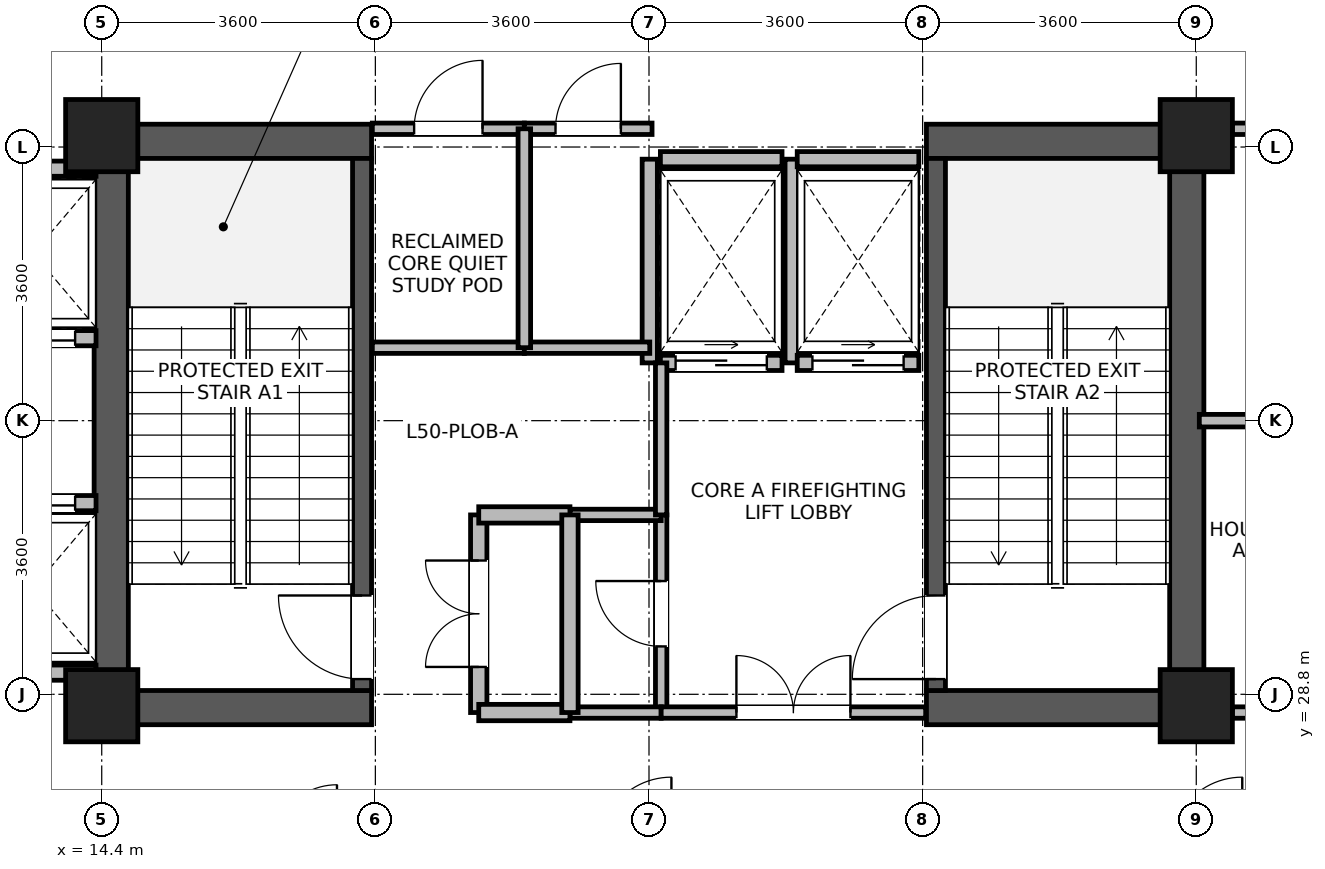
"""IFC4 building model, lengths in metres.
Left out: names, types, materials, properties, quantities, classifications, styles, units other than length and angle.
Written with IfcOpenShell. Run it as: python <this file> out.ifc"""

import sys

from ifc_helpers import new_model, si_unit, direction, frame, frame_2d, origin, origin_2d, place, context, subcontext, project, spatial, rectangle, extrude, source, transform, mapped, element, fill, save


model = new_model("IFC4")
c1 = context("Model", 3, precision=1e-05, world=origin(), true_north=direction((0.0, 1.0)))
c2 = subcontext(c1, "Body", "Model", "MODEL_VIEW")
j1 = project(units=[si_unit("LENGTHUNIT", "METRE"), si_unit("PLANEANGLEUNIT", "RADIAN")], contexts=[c1])
p1 = place(None, origin())
s1 = spatial("IfcSite", under=j1, at=p1, CompositionType="ELEMENT")
p2 = place(p1, origin())
s2 = spatial("IfcBuilding", under=s1, at=p2, CompositionType="ELEMENT")
p3 = place(p2, frame((0.0, 0.0, 197.2)))
s3 = spatial("IfcBuildingStorey", under=s2, at=p3, CompositionType="ELEMENT", Elevation=197.2)
for number, where, z_axis, x_axis in (
    (1, (14.525, 28.4, 0.0), (0.0, 0.0, 1.0), (0.0, 1.0, 0.0)),
    (2, (28.675, 28.4, 0.0), (0.0, 0.0, 1.0), (0.0, 1.0, 0.0)),
):
    element("IfcWall", number, at=place(p3, frame(where, z_axis=z_axis, x_axis=x_axis)), inside=s3, PredefinedType="SHEAR", context=c2, shape_type="SweptSolid", body=[
        extrude(rectangle(XDim=7.9, YDim=0.45, at=frame_2d((3.95, 0.0))), origin(), (0.0, 0.0, 1.0), 4.37),
    ])
for number, where, z_axis, x_axis in (
    (3, (14.75, 28.625, 0.0), (0.0, 0.0, 1.0), (1.0, 0.0, 0.0)),
    (4, (25.25, 28.625, 0.0), (0.0, 0.0, 1.0), (1.0, 0.0, 0.0)),
    (5, (14.75, 36.075, 0.0), (0.0, 0.0, 1.0), (1.0, 0.0, 0.0)),
    (6, (25.25, 36.075, 0.0), (0.0, 0.0, 1.0), (1.0, 0.0, 0.0)),
):
    element("IfcWall", number, at=place(p3, frame(where, z_axis=z_axis, x_axis=x_axis)), inside=s3, PredefinedType="SHEAR", context=c2, shape_type="SweptSolid", body=[
        extrude(rectangle(XDim=3.2, YDim=0.45, at=frame_2d((1.6, 0.0))), origin(), (0.0, 0.0, 1.0), 4.37),
    ])
p4 = place(p3, frame((17.825, 28.85, 0.0), z_axis=(0.0, 0.0, 1.0), x_axis=(0.0, 1.0, 0.0)))
e7 = element("IfcWall", 7, at=p4, inside=s3, PredefinedType="SHEAR", context=c2, shape_type="SweptSolid", body=[
    extrude(rectangle(XDim=7.0, YDim=0.25, at=frame_2d((3.5, 0.0))), origin(), (0.0, 0.0, 1.0), 4.37),
])
p5 = place(p4, frame((0.15, 0.0, 0.0)))
e8 = element("IfcOpeningElement", 8, at=p5, cuts=e7, PredefinedType="OPENING", context=c2, shape_type="SweptSolid", body=[
    extrude(rectangle(XDim=1.1, YDim=2.08, at=frame_2d((0.55, 1.04))), frame((0.0, 0.135, 0.0), z_axis=(0.0, -1.0, 0.0), x_axis=(1.0, 0.0, 0.0)), (0.0, 0.0, 1.0), 0.27),
])
p6 = place(p3, frame((25.375, 28.85, 0.0), z_axis=(0.0, 0.0, 1.0), x_axis=(0.0, 1.0, 0.0)))
e9 = element("IfcWall", 9, at=p6, inside=s3, PredefinedType="SHEAR", context=c2, shape_type="SweptSolid", body=[
    extrude(rectangle(XDim=7.0, YDim=0.25, at=frame_2d((3.5, 0.0))), origin(), (0.0, 0.0, 1.0), 4.37),
])
p7 = place(p6, frame((0.15, 0.0, 0.0)))
e10 = element("IfcOpeningElement", 10, at=p7, cuts=e9, PredefinedType="OPENING", context=c2, shape_type="SweptSolid", body=[
    extrude(rectangle(XDim=1.1, YDim=2.08, at=frame_2d((0.55, 1.04))), frame((0.0, 0.135, 0.0), z_axis=(0.0, -1.0, 0.0), x_axis=(1.0, 0.0, 0.0)), (0.0, 0.0, 1.0), 0.27),
])
m1 = source(origin(), c2, "Body", "SweptSolid", [
    extrude(rectangle(XDim=0.95, YDim=0.95, at=origin_2d()), origin(), (0.0, 0.0, 1.0), 4.6),
])
for number, where, z_axis, x_axis in (
    (11, (14.4, 28.65, 0.0), (0.0, 0.0, 1.0), (1.0, 0.0, 0.0)),
    (12, (14.4, 36.15, 0.0), (0.0, 0.0, 1.0), (1.0, 0.0, 0.0)),
    (13, (28.8, 28.65, 0.0), (0.0, 0.0, 1.0), (1.0, 0.0, 0.0)),
    (14, (28.8, 36.15, 0.0), (0.0, 0.0, 1.0), (1.0, 0.0, 0.0)),
):
    element("IfcColumn", number, at=place(p3, frame(where, z_axis=z_axis, x_axis=x_axis)), inside=s3, PredefinedType="COLUMN", context=c2, shape_type="MappedRepresentation", body=[
        mapped(m1, transform((0.0, 0.0, 0.0), x_axis=(1.0, 0.0, 0.0), y_axis=(0.0, 1.0, 0.0), z_axis=(0.0, 0.0, 1.0), scale=1.0)),
    ])
p8 = place(p3, frame((12.675, 33.485, 0.0), z_axis=(0.0, 0.0, 1.0), x_axis=(1.0, 0.0, 0.0)))
e15 = element("IfcWall", 15, at=p8, inside=s3, PredefinedType="PARTITIONING", context=c2, shape_type="SweptSolid", body=[
    extrude(rectangle(XDim=1.65, YDim=0.2, at=frame_2d((0.825, 0.0))), origin(), (0.0, 0.0, 1.0), 4.35),
])
p9 = place(p8, frame((0.275, 0.0, 0.0)))
e16 = element("IfcOpeningElement", 16, at=p9, cuts=e15, PredefinedType="OPENING", context=c2, shape_type="SweptSolid", body=[
    extrude(rectangle(XDim=1.1, YDim=2.12, at=frame_2d((0.55, 1.06))), frame((0.0, 0.11, 0.0), z_axis=(0.0, -1.0, 0.0), x_axis=(1.0, 0.0, 0.0)), (0.0, 0.0, 1.0), 0.22),
])
for number, where, z_axis, x_axis in (
    (17, (12.675, 35.715, 0.0), (0.0, 0.0, 1.0), (1.0, 0.0, 0.0)),
    (18, (12.675, 29.085, 0.0), (0.0, 0.0, 1.0), (1.0, 0.0, 0.0)),
):
    element("IfcWall", number, at=place(p3, frame(where, z_axis=z_axis, x_axis=x_axis)), inside=s3, PredefinedType="PARTITIONING", context=c2, shape_type="SweptSolid", body=[
        extrude(rectangle(XDim=1.65, YDim=0.2, at=frame_2d((0.825, 0.0))), origin(), (0.0, 0.0, 1.0), 4.35),
    ])
p10 = place(p3, frame((12.675, 31.315, 0.0), z_axis=(0.0, 0.0, 1.0), x_axis=(1.0, 0.0, 0.0)))
e19 = element("IfcWall", 19, at=p10, inside=s3, PredefinedType="PARTITIONING", context=c2, shape_type="SweptSolid", body=[
    extrude(rectangle(XDim=1.65, YDim=0.2, at=frame_2d((0.825, 0.0))), origin(), (0.0, 0.0, 1.0), 4.35),
])
p11 = place(p10, frame((0.275, 0.0, 0.0)))
e20 = element("IfcOpeningElement", 20, at=p11, cuts=e19, PredefinedType="OPENING", context=c2, shape_type="SweptSolid", body=[
    extrude(rectangle(XDim=1.1, YDim=2.12, at=frame_2d((0.55, 1.06))), frame((0.0, 0.11, 0.0), z_axis=(0.0, -1.0, 0.0), x_axis=(1.0, 0.0, 0.0)), (0.0, 0.0, 1.0), 0.22),
])
p12 = place(p3, frame((21.75, 33.16, 0.0), z_axis=(0.0, 0.0, 1.0), x_axis=(1.0, 0.0, 0.0)))
e21 = element("IfcWall", 21, at=p12, inside=s3, PredefinedType="PARTITIONING", context=c2, shape_type="SweptSolid", body=[
    extrude(rectangle(XDim=1.6, YDim=0.2, at=frame_2d((0.8, 0.0))), origin(), (0.0, 0.0, 1.0), 4.35),
])
p13 = place(p12, frame((0.2, 0.0, 0.0)))
e22 = element("IfcOpeningElement", 22, at=p13, cuts=e21, PredefinedType="OPENING", context=c2, shape_type="SweptSolid", body=[
    extrude(rectangle(XDim=1.2, YDim=2.12, at=frame_2d((0.6, 1.06))), frame((0.0, 0.11, 0.0), z_axis=(0.0, -1.0, 0.0), x_axis=(1.0, 0.0, 0.0)), (0.0, 0.0, 1.0), 0.22),
])
p14 = place(p3, frame((21.75, 35.84, 0.0), z_axis=(0.0, 0.0, 1.0), x_axis=(1.0, 0.0, 0.0)))
e23 = element("IfcWall", 23, at=p14, inside=s3, PredefinedType="PARTITIONING", context=c2, shape_type="SweptSolid", body=[
    extrude(rectangle(XDim=1.6, YDim=0.2, at=frame_2d((0.8, 0.0))), origin(), (0.0, 0.0, 1.0), 3.35),
])
for number, where, z_axis, x_axis in (
    (24, (21.61, 33.16, 0.0), (0.0, 0.0, 1.0), (0.0, 1.0, 0.0)),
    (25, (23.49, 33.16, 0.0), (0.0, 0.0, 1.0), (0.0, 1.0, 0.0)),
):
    element("IfcWall", number, at=place(p3, frame(where, z_axis=z_axis, x_axis=x_axis)), inside=s3, PredefinedType="PARTITIONING", context=c2, shape_type="SweptSolid", body=[
        extrude(rectangle(XDim=2.68, YDim=0.2, at=frame_2d((1.34, 0.0))), origin(), (0.0, 0.0, 1.0), 4.35),
    ])
p15 = place(p3, frame((23.55, 33.16, 0.0), z_axis=(0.0, 0.0, 1.0), x_axis=(1.0, 0.0, 0.0)))
e26 = element("IfcWall", 26, at=p15, inside=s3, PredefinedType="PARTITIONING", context=c2, shape_type="SweptSolid", body=[
    extrude(rectangle(XDim=1.6, YDim=0.2, at=frame_2d((0.8, 0.0))), origin(), (0.0, 0.0, 1.0), 4.35),
])
p16 = place(p15, frame((0.2, 0.0, 0.0)))
e27 = element("IfcOpeningElement", 27, at=p16, cuts=e26, PredefinedType="OPENING", context=c2, shape_type="SweptSolid", body=[
    extrude(rectangle(XDim=1.2, YDim=2.12, at=frame_2d((0.6, 1.06))), frame((0.0, 0.11, 0.0), z_axis=(0.0, -1.0, 0.0), x_axis=(1.0, 0.0, 0.0)), (0.0, 0.0, 1.0), 0.22),
])
p17 = place(p3, frame((23.55, 35.84, 0.0), z_axis=(0.0, 0.0, 1.0), x_axis=(1.0, 0.0, 0.0)))
e28 = element("IfcWall", 28, at=p17, inside=s3, PredefinedType="PARTITIONING", context=c2, shape_type="SweptSolid", body=[
    extrude(rectangle(XDim=1.6, YDim=0.2, at=frame_2d((0.8, 0.0))), origin(), (0.0, 0.0, 1.0), 3.35),
])
p18 = place(p3, frame((29.275, 36.24, 0.0), z_axis=(0.0, 0.0, 1.0), x_axis=(1.0, 0.0, 0.0)))
e29 = element("IfcWall", 29, at=p18, inside=s3, PredefinedType="PARTITIONING", context=c2, shape_type="SweptSolid", body=[
    extrude(rectangle(XDim=4.085, YDim=0.15, at=frame_2d((2.042, 0.0))), origin(), (0.0, 0.0, 1.0), 3.75),
])
p19 = place(p18, frame((1.393, 0.0, 0.0)))
e30 = element("IfcOpeningElement", 30, at=p19, cuts=e29, PredefinedType="OPENING", context=c2, shape_type="SweptSolid", body=[
    extrude(rectangle(XDim=1.3, YDim=2.12, at=frame_2d((0.65, 1.06))), frame((0.0, 0.085, 0.0), z_axis=(0.0, -1.0, 0.0), x_axis=(1.0, 0.0, 0.0)), (0.0, 0.0, 1.0), 0.17),
])
p20 = place(p3, frame((19.36, 28.56, 0.0), z_axis=(0.0, 0.0, 1.0), x_axis=(0.0, 1.0, 0.0)))
e31 = element("IfcWall", 31, at=p20, inside=s3, PredefinedType="PARTITIONING", context=c2, shape_type="SweptSolid", body=[
    extrude(rectangle(XDim=2.6, YDim=0.215, at=frame_2d((1.3, 0.0))), origin(), (0.0, 0.0, 1.0), 4.35),
])
p21 = place(p20, frame((0.6, 0.0, 0.0)))
e32 = element("IfcOpeningElement", 32, at=p21, cuts=e31, PredefinedType="OPENING", context=c2, shape_type="SweptSolid", body=[
    extrude(rectangle(XDim=1.4, YDim=2.15, at=frame_2d((0.7, 1.075))), frame((0.0, 0.118, 0.0), z_axis=(0.0, -1.0, 0.0), x_axis=(1.0, 0.0, 0.0)), (0.0, 0.0, 1.0), 0.235),
])
p22 = place(p3, frame((21.76, 28.56, 0.0), z_axis=(0.0, 0.0, 1.0), x_axis=(0.0, 1.0, 0.0)))
e33 = element("IfcWall", 33, at=p22, inside=s3, PredefinedType="PARTITIONING", context=c2, shape_type="SweptSolid", body=[
    extrude(rectangle(XDim=2.6, YDim=0.15, at=frame_2d((1.3, 0.0))), origin(), (0.0, 0.0, 1.0), 4.35),
])
p23 = place(p22, frame((0.87, 0.0, 0.0)))
e34 = element("IfcOpeningElement", 34, at=p23, cuts=e33, PredefinedType="OPENING", context=c2, shape_type="SweptSolid", body=[
    extrude(rectangle(XDim=0.86, YDim=2.02, at=frame_2d((0.43, 1.01))), frame((0.0, 0.085, 0.0), z_axis=(0.0, -1.0, 0.0), x_axis=(1.0, 0.0, 0.0)), (0.0, 0.0, 1.0), 0.17),
])
p24 = place(p3, frame((29.275, 28.56, 0.0), z_axis=(0.0, 0.0, 1.0), x_axis=(1.0, 0.0, 0.0)))
e35 = element("IfcWall", 35, at=p24, inside=s3, PredefinedType="PARTITIONING", context=c2, shape_type="SweptSolid", body=[
    extrude(rectangle(XDim=1.825, YDim=0.15, at=frame_2d((0.913, 0.0))), origin(), (0.0, 0.0, 1.0), 3.75),
])
p25 = place(p24, frame((0.482, 0.0, 0.0)))
e36 = element("IfcOpeningElement", 36, at=p25, cuts=e35, PredefinedType="OPENING", context=c2, shape_type="SweptSolid", body=[
    extrude(rectangle(XDim=0.86, YDim=2.02, at=frame_2d((0.43, 1.01))), frame((0.0, 0.085, 0.0), z_axis=(0.0, -1.0, 0.0), x_axis=(1.0, 0.0, 0.0)), (0.0, 0.0, 1.0), 0.17),
])
p26 = place(p3, frame((17.96, 33.36, 0.0), z_axis=(0.0, 0.0, 1.0), x_axis=(1.0, 0.0, 0.0)))
e37 = element("IfcWall", 37, at=p26, inside=s3, PredefinedType="PARTITIONING", context=c2, shape_type="SweptSolid", body=[
    extrude(rectangle(XDim=2.0, YDim=0.15, at=frame_2d((1.0, 0.0))), origin(), (0.0, 0.0, 1.0), 4.35),
])
p27 = place(p3, frame((17.96, 36.24, 0.0), z_axis=(0.0, 0.0, 1.0), x_axis=(1.0, 0.0, 0.0)))
e38 = element("IfcWall", 38, at=p27, inside=s3, PredefinedType="PARTITIONING", context=c2, shape_type="SweptSolid", body=[
    extrude(rectangle(XDim=2.0, YDim=0.15, at=frame_2d((1.0, 0.0))), origin(), (0.0, 0.0, 1.0), 3.35),
])
p28 = place(p27, frame((0.55, 0.0, 0.0)))
e39 = element("IfcOpeningElement", 39, at=p28, cuts=e38, PredefinedType="OPENING", context=c2, shape_type="SweptSolid", body=[
    extrude(rectangle(XDim=0.9, YDim=2.08, at=frame_2d((0.45, 1.04))), frame((0.0, 0.085, 0.0), z_axis=(0.0, -1.0, 0.0), x_axis=(1.0, 0.0, 0.0)), (0.0, 0.0, 1.0), 0.17),
])
p29 = place(p3, frame((19.96, 33.36, 0.0), z_axis=(0.0, 0.0, 1.0), x_axis=(1.0, 0.0, 0.0)))
e40 = element("IfcWall", 40, at=p29, inside=s3, PredefinedType="PARTITIONING", context=c2, shape_type="SweptSolid", body=[
    extrude(rectangle(XDim=1.65, YDim=0.15, at=frame_2d((0.825, 0.0))), origin(), (0.0, 0.0, 1.0), 4.35),
])
p30 = place(p3, frame((19.96, 36.24, 0.0), z_axis=(0.0, 0.0, 1.0), x_axis=(1.0, 0.0, 0.0)))
e41 = element("IfcWall", 41, at=p30, inside=s3, PredefinedType="PARTITIONING", context=c2, shape_type="SweptSolid", body=[
    extrude(rectangle(XDim=1.68, YDim=0.15, at=frame_2d((0.84, 0.0))), origin(), (0.0, 0.0, 1.0), 3.35),
])
p31 = place(p30, frame((0.41, 0.0, 0.0)))
e42 = element("IfcOpeningElement", 42, at=p31, cuts=e41, PredefinedType="OPENING", context=c2, shape_type="SweptSolid", body=[
    extrude(rectangle(XDim=0.86, YDim=2.02, at=frame_2d((0.43, 1.01))), frame((0.0, 0.085, 0.0), z_axis=(0.0, -1.0, 0.0), x_axis=(1.0, 0.0, 0.0)), (0.0, 0.0, 1.0), 0.17),
])
p32 = place(p3, frame((20.56, 28.56, 0.0), z_axis=(0.0, 0.0, 1.0), x_axis=(1.0, 0.0, 0.0)))
e43 = element("IfcWall", 43, at=p32, inside=s3, PredefinedType="PARTITIONING", context=c2, shape_type="SweptSolid", body=[
    extrude(rectangle(XDim=1.2, YDim=0.15, at=frame_2d((0.6, 0.0))), origin(), (0.0, 0.0, 1.0), 3.35),
])
p33 = place(p3, frame((20.56, 31.16, 0.0), z_axis=(0.0, 0.0, 1.0), x_axis=(1.0, 0.0, 0.0)))
e44 = element("IfcWall", 44, at=p33, inside=s3, PredefinedType="PARTITIONING", context=c2, shape_type="SweptSolid", body=[
    extrude(rectangle(XDim=1.2, YDim=0.15, at=frame_2d((0.6, 0.0))), origin(), (0.0, 0.0, 1.0), 4.35),
])
p34 = place(p3, frame((19.36, 28.56, 0.0), z_axis=(0.0, 0.0, 1.0), x_axis=(1.0, 0.0, 0.0)))
e45 = element("IfcWall", 45, at=p34, inside=s3, PredefinedType="PARTITIONING", context=c2, shape_type="SweptSolid", body=[
    extrude(rectangle(XDim=1.2, YDim=0.215, at=frame_2d((0.6, 0.0))), origin(), (0.0, 0.0, 1.0), 3.35),
])
p35 = place(p3, frame((19.36, 31.16, 0.0), z_axis=(0.0, 0.0, 1.0), x_axis=(1.0, 0.0, 0.0)))
e46 = element("IfcWall", 46, at=p35, inside=s3, PredefinedType="PARTITIONING", context=c2, shape_type="SweptSolid", body=[
    extrude(rectangle(XDim=1.2, YDim=0.215, at=frame_2d((0.6, 0.0))), origin(), (0.0, 0.0, 1.0), 4.35),
])
p36 = place(p3, frame((21.76, 28.56, 0.0), z_axis=(0.0, 0.0, 1.0), x_axis=(1.0, 0.0, 0.0)))
e47 = element("IfcWall", 47, at=p36, inside=s3, PredefinedType="PARTITIONING", context=c2, shape_type="SweptSolid", body=[
    extrude(rectangle(XDim=3.48, YDim=0.15, at=frame_2d((1.74, 0.0))), origin(), (0.0, 0.0, 1.0), 3.35),
])
p37 = place(p36, frame((0.99, 0.0, 0.0)))
e48 = element("IfcOpeningElement", 48, at=p37, cuts=e47, PredefinedType="OPENING", context=c2, shape_type="SweptSolid", body=[
    extrude(rectangle(XDim=1.5, YDim=2.1, at=frame_2d((0.75, 1.05))), frame((0.0, 0.085, 0.0), z_axis=(0.0, -1.0, 0.0), x_axis=(1.0, 0.0, 0.0)), (0.0, 0.0, 1.0), 0.17),
])
p38 = place(p3, frame((19.96, 33.36, 0.0), z_axis=(0.0, 0.0, 1.0), x_axis=(0.0, 1.0, 0.0)))
e49 = element("IfcWall", 49, at=p38, inside=s3, PredefinedType="PARTITIONING", context=c2, shape_type="SweptSolid", body=[
    extrude(rectangle(XDim=2.88, YDim=0.165, at=frame_2d((1.44, 0.0))), origin(), (0.0, 0.0, 1.0), 4.35),
])
p39 = place(p3, frame((20.56, 28.56, 0.0), z_axis=(0.0, 0.0, 1.0), x_axis=(0.0, 1.0, 0.0)))
e50 = element("IfcWall", 50, at=p39, inside=s3, PredefinedType="PARTITIONING", context=c2, shape_type="SweptSolid", body=[
    extrude(rectangle(XDim=2.6, YDim=0.215, at=frame_2d((1.3, 0.0))), origin(), (0.0, 0.0, 1.0), 4.35),
])
p40 = place(p3, frame((28.84, 32.4, 0.0), z_axis=(0.0, 0.0, 1.0), x_axis=(1.0, 0.0, 0.0)))
e51 = element("IfcWall", 51, at=p40, inside=s3, PredefinedType="PARTITIONING", context=c2, shape_type="SweptSolid", body=[
    extrude(rectangle(XDim=2.26, YDim=0.165, at=frame_2d((1.13, 0.0))), origin(), (0.0, 0.0, 1.0), 4.35),
])
p41 = place(p3, frame((21.76, 31.16, 0.0), z_axis=(0.0, 0.0, 1.0), x_axis=(0.0, 1.0, 0.0)))
e52 = element("IfcWall", 52, at=p41, inside=s3, PredefinedType="PARTITIONING", context=c2, shape_type="SweptSolid", body=[
    extrude(rectangle(XDim=2.0, YDim=0.15, at=frame_2d((1.0, 0.0))), origin(), (0.0, 0.0, 1.0), 4.35),
])
p42 = place(p5, origin())
e53 = element("IfcDoor", 53, at=p42, inside=s3, OperationType="SINGLE_SWING_RIGHT", PredefinedType="DOOR", context=c2, shape_type="SweptSolid", body=[
    extrude(rectangle(XDim=1.1, YDim=2.08, at=frame_2d((0.55, 1.04))), frame((0.0, 0.025, 0.0), z_axis=(0.0, -1.0, 0.0), x_axis=(1.0, 0.0, 0.0)), (0.0, 0.0, 1.0), 0.05),
])
fill(e8, e53)
p43 = place(p7, origin())
e54 = element("IfcDoor", 54, at=p43, inside=s3, OperationType="SINGLE_SWING_LEFT", PredefinedType="DOOR", context=c2, shape_type="SweptSolid", body=[
    extrude(rectangle(XDim=1.1, YDim=2.08, at=frame_2d((0.55, 1.04))), frame((0.0, 0.025, 0.0), z_axis=(0.0, -1.0, 0.0), x_axis=(1.0, 0.0, 0.0)), (0.0, 0.0, 1.0), 0.05),
])
fill(e10, e54)
p44 = place(p9, origin())
e55 = element("IfcDoor", 55, at=p44, inside=s3, OperationType="SLIDING_TO_LEFT", PredefinedType="DOOR", context=c2, shape_type="SweptSolid", body=[
    extrude(rectangle(XDim=1.1, YDim=2.12, at=frame_2d((0.55, 1.06))), frame((0.0, 0.025, 0.0), z_axis=(0.0, -1.0, 0.0), x_axis=(1.0, 0.0, 0.0)), (0.0, 0.0, 1.0), 0.05),
])
fill(e16, e55)
p45 = place(p11, origin())
e56 = element("IfcDoor", 56, at=p45, inside=s3, OperationType="SLIDING_TO_LEFT", PredefinedType="DOOR", context=c2, shape_type="SweptSolid", body=[
    extrude(rectangle(XDim=1.1, YDim=2.12, at=frame_2d((0.55, 1.06))), frame((0.0, 0.025, 0.0), z_axis=(0.0, -1.0, 0.0), x_axis=(1.0, 0.0, 0.0)), (0.0, 0.0, 1.0), 0.05),
])
fill(e20, e56)
p46 = place(p13, origin())
e57 = element("IfcDoor", 57, at=p46, inside=s3, OperationType="SLIDING_TO_RIGHT", PredefinedType="DOOR", context=c2, shape_type="SweptSolid", body=[
    extrude(rectangle(XDim=1.2, YDim=2.12, at=frame_2d((0.6, 1.06))), frame((0.0, 0.025, 0.0), z_axis=(0.0, -1.0, 0.0), x_axis=(1.0, 0.0, 0.0)), (0.0, 0.0, 1.0), 0.05),
])
fill(e22, e57)
p47 = place(p16, origin())
e58 = element("IfcDoor", 58, at=p47, inside=s3, OperationType="SLIDING_TO_RIGHT", PredefinedType="DOOR", context=c2, shape_type="SweptSolid", body=[
    extrude(rectangle(XDim=1.2, YDim=2.12, at=frame_2d((0.6, 1.06))), frame((0.0, 0.025, 0.0), z_axis=(0.0, -1.0, 0.0), x_axis=(1.0, 0.0, 0.0)), (0.0, 0.0, 1.0), 0.05),
])
fill(e27, e58)
p48 = place(p21, origin())
e59 = element("IfcDoor", 59, at=p48, inside=s3, OperationType="DOUBLE_DOOR_SINGLE_SWING", PredefinedType="DOOR", context=c2, shape_type="SweptSolid", body=[
    extrude(rectangle(XDim=1.4, YDim=2.15, at=frame_2d((0.7, 1.075))), frame((0.0, 0.025, 0.0), z_axis=(0.0, -1.0, 0.0), x_axis=(1.0, 0.0, 0.0)), (0.0, 0.0, 1.0), 0.05),
])
fill(e32, e59)
p49 = place(p23, origin())
e60 = element("IfcDoor", 60, at=p49, inside=s3, OperationType="SINGLE_SWING_RIGHT", PredefinedType="DOOR", context=c2, shape_type="SweptSolid", body=[
    extrude(rectangle(XDim=0.86, YDim=2.02, at=frame_2d((0.43, 1.01))), frame((0.0, 0.025, 0.0), z_axis=(0.0, -1.0, 0.0), x_axis=(1.0, 0.0, 0.0)), (0.0, 0.0, 1.0), 0.05),
])
fill(e34, e60)
p50 = place(p28, origin())
e61 = element("IfcDoor", 61, at=p50, inside=s3, OperationType="SINGLE_SWING_RIGHT", PredefinedType="DOOR", context=c2, shape_type="SweptSolid", body=[
    extrude(rectangle(XDim=0.9, YDim=2.08, at=frame_2d((0.45, 1.04))), frame((0.0, 0.025, 0.0), z_axis=(0.0, -1.0, 0.0), x_axis=(1.0, 0.0, 0.0)), (0.0, 0.0, 1.0), 0.05),
])
fill(e39, e61)
p51 = place(p31, origin())
e62 = element("IfcDoor", 62, at=p51, inside=s3, OperationType="SINGLE_SWING_RIGHT", PredefinedType="DOOR", context=c2, shape_type="SweptSolid", body=[
    extrude(rectangle(XDim=0.86, YDim=2.02, at=frame_2d((0.43, 1.01))), frame((0.0, 0.025, 0.0), z_axis=(0.0, -1.0, 0.0), x_axis=(1.0, 0.0, 0.0)), (0.0, 0.0, 1.0), 0.05),
])
fill(e42, e62)
p52 = place(p37, origin())
e63 = element("IfcDoor", 63, at=p52, inside=s3, OperationType="DOUBLE_DOOR_SINGLE_SWING", PredefinedType="DOOR", context=c2, shape_type="SweptSolid", body=[
    extrude(rectangle(XDim=1.5, YDim=2.1, at=frame_2d((0.75, 1.05))), frame((0.0, 0.025, 0.0), z_axis=(0.0, -1.0, 0.0), x_axis=(1.0, 0.0, 0.0)), (0.0, 0.0, 1.0), 0.05),
])
fill(e48, e63)
save(model, sys.argv[1])
